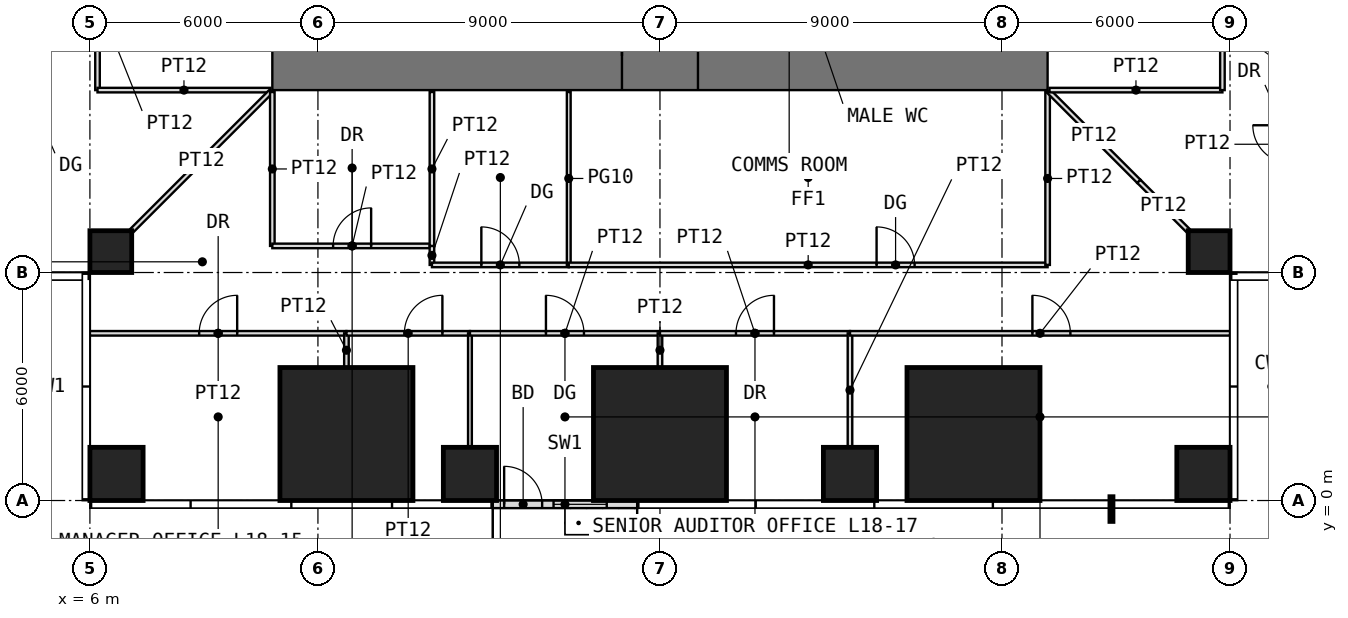
"""IFC4 building model, lengths in metres.
Left out: names, types, materials, properties, quantities, classifications, styles, units other than length and angle.
Written with IfcOpenShell. Run it as: python <this file> out.ifc"""

import sys

from ifc_helpers import new_model, si_unit, direction, frame, frame_2d, origin, origin_2d, place, context, subcontext, project, spatial, rectangle, extrude, element, fill, save


model = new_model("IFC4")
c1 = context("Model", 3, precision=1e-05, world=origin(), true_north=direction((0.0, 1.0)))
c2 = subcontext(c1, "Body", "Model", "MODEL_VIEW")
j1 = project(units=[si_unit("LENGTHUNIT", "METRE"), si_unit("PLANEANGLEUNIT", "RADIAN")], contexts=[c1])
p1 = place(None, origin())
s1 = spatial("IfcSite", under=j1, at=p1, CompositionType="ELEMENT")
p2 = place(p1, origin())
s2 = spatial("IfcBuilding", under=s1, at=p2, CompositionType="ELEMENT")
p3 = place(p2, frame((0.0, 0.0, 78.5)))
s3 = spatial("IfcBuildingStorey", under=s2, at=p3, CompositionType="ELEMENT", Elevation=78.5)
p4 = place(p3, frame((6.7, 0.7, 0.0), z_axis=(0.0, 0.0, 1.0), x_axis=(1.0, 0.0, 0.0)))
e1 = element("IfcColumn", 1, at=p4, inside=s3, PredefinedType="COLUMN", context=c2, shape_type="SweptSolid", body=[
    extrude(rectangle(XDim=1.4, YDim=1.4, at=origin_2d()), origin(), (0.0, 0.0, 1.0), 4.0),
])
p5 = place(p3, frame((12.75, 1.75, 0.0), z_axis=(0.0, 0.0, 1.0), x_axis=(1.0, 0.0, 0.0)))
e2 = element("IfcColumn", 2, at=p5, inside=s3, PredefinedType="COLUMN", context=c2, shape_type="SweptSolid", body=[
    extrude(rectangle(XDim=3.5, YDim=3.5, at=origin_2d()), origin(), (0.0, 0.0, 1.0), 4.0),
])
p6 = place(p3, frame((16.0, 0.7, 0.0), z_axis=(0.0, 0.0, 1.0), x_axis=(1.0, 0.0, 0.0)))
e3 = element("IfcColumn", 3, at=p6, inside=s3, PredefinedType="COLUMN", context=c2, shape_type="SweptSolid", body=[
    extrude(rectangle(XDim=1.4, YDim=1.4, at=origin_2d()), origin(), (0.0, 0.0, 1.0), 4.0),
])
p7 = place(p3, frame((21.0, 1.75, 0.0), z_axis=(0.0, 0.0, 1.0), x_axis=(1.0, 0.0, 0.0)))
e4 = element("IfcColumn", 4, at=p7, inside=s3, PredefinedType="COLUMN", context=c2, shape_type="SweptSolid", body=[
    extrude(rectangle(XDim=3.5, YDim=3.5, at=origin_2d()), origin(), (0.0, 0.0, 1.0), 4.0),
])
p8 = place(p3, frame((26.0, 0.7, 0.0), z_axis=(0.0, 0.0, 1.0), x_axis=(1.0, 0.0, 0.0)))
e5 = element("IfcColumn", 5, at=p8, inside=s3, PredefinedType="COLUMN", context=c2, shape_type="SweptSolid", body=[
    extrude(rectangle(XDim=1.4, YDim=1.4, at=origin_2d()), origin(), (0.0, 0.0, 1.0), 4.0),
])
p9 = place(p3, frame((29.25, 1.75, 0.0), z_axis=(0.0, 0.0, 1.0), x_axis=(1.0, 0.0, 0.0)))
e6 = element("IfcColumn", 6, at=p9, inside=s3, PredefinedType="COLUMN", context=c2, shape_type="SweptSolid", body=[
    extrude(rectangle(XDim=3.5, YDim=3.5, at=origin_2d()), origin(), (0.0, 0.0, 1.0), 4.0),
])
p10 = place(p3, frame((35.3, 0.7, 0.0), z_axis=(0.0, 0.0, 1.0), x_axis=(1.0, 0.0, 0.0)))
e7 = element("IfcColumn", 7, at=p10, inside=s3, PredefinedType="COLUMN", context=c2, shape_type="SweptSolid", body=[
    extrude(rectangle(XDim=1.4, YDim=1.4, at=origin_2d()), origin(), (0.0, 0.0, 1.0), 4.0),
])
for number, where, z_axis, x_axis in (
    (8, (6.55, 6.55, 0.0), (0.0, 0.0, 1.0), (1.0, 0.0, 0.0)),
    (9, (35.45, 6.55, 0.0), (0.0, 0.0, 1.0), (1.0, 0.0, 0.0)),
):
    element("IfcColumn", number, at=place(p3, frame(where, z_axis=z_axis, x_axis=x_axis)), inside=s3, PredefinedType="COLUMN", context=c2, shape_type="SweptSolid", body=[
        extrude(rectangle(XDim=1.1, YDim=1.1, at=origin_2d()), origin(), (0.0, 0.0, 1.0), 4.0),
    ])
p11 = place(p3, frame((16.6, -0.1, 0.0), z_axis=(0.0, 0.0, 1.0), x_axis=(1.0, 0.0, 0.0)))
e10 = element("IfcWall", 10, at=p11, inside=s3, PredefinedType="USERDEFINED", context=c2, shape_type="SweptSolid", body=[
    extrude(rectangle(XDim=3.8, YDim=0.2, at=frame_2d((1.9, 0.0))), origin(), (0.0, 0.0, 1.0), 3.75),
])
p12 = place(p11, frame((0.3, 0.0, 0.0)))
e11 = element("IfcOpeningElement", 11, at=p12, cuts=e10, PredefinedType="OPENING", context=c2, shape_type="SweptSolid", body=[
    extrude(rectangle(XDim=1.0, YDim=2.4, at=frame_2d((0.5, 1.2))), frame((0.0, 0.11, 0.0), z_axis=(0.0, -1.0, 0.0), x_axis=(1.0, 0.0, 0.0)), (0.0, 0.0, 1.0), 0.22),
])
p13 = place(p11, frame((1.6, 0.0, 0.3)))
e12 = element("IfcOpeningElement", 12, at=p13, cuts=e10, PredefinedType="OPENING", context=c2, shape_type="SweptSolid", body=[
    extrude(rectangle(XDim=1.4, YDim=2.7, at=frame_2d((0.7, 1.35))), frame((0.0, 0.11, 0.0), z_axis=(0.0, -1.0, 0.0), x_axis=(1.0, 0.0, 0.0)), (0.0, 0.0, 1.0), 0.22),
])
p14 = place(p3, frame((10.8, 11.7, -0.05), z_axis=(0.0, 0.0, 1.0), x_axis=(1.0, 0.0, 0.0)))
e13 = element("IfcWall", 13, at=p14, inside=s3, PredefinedType="SHEAR", context=c2, shape_type="SweptSolid", body=[
    extrude(rectangle(XDim=20.4, YDim=1.8, at=frame_2d((10.2, 0.0))), origin(), (0.0, 0.0, 1.0), 4.0),
])
p15 = place(p14, frame((9.2, 0.0, 0.05)))
e14 = element("IfcOpeningElement", 14, at=p15, cuts=e13, PredefinedType="OPENING", context=c2, shape_type="SweptSolid", body=[
    extrude(rectangle(XDim=2.0, YDim=2.2, at=frame_2d((1.0, 1.1))), frame((0.0, 0.91, 0.0), z_axis=(0.0, -1.0, 0.0), x_axis=(1.0, 0.0, 0.0)), (0.0, 0.0, 1.0), 1.82),
])
p16 = place(p3, frame((6.0, 4.4, 0.0), z_axis=(0.0, 0.0, 1.0), x_axis=(1.0, 0.0, 0.0)))
e15 = element("IfcWall", 15, at=p16, inside=s3, PredefinedType="PARTITIONING", context=c2, shape_type="SweptSolid", body=[
    extrude(rectangle(XDim=6.75, YDim=0.12, at=frame_2d((3.375, 0.0))), origin(), (0.0, 0.0, 1.0), 3.75),
])
p17 = place(p16, frame((2.875, 0.0, 0.0)))
e16 = element("IfcOpeningElement", 16, at=p17, cuts=e15, PredefinedType="OPENING", context=c2, shape_type="SweptSolid", body=[
    extrude(rectangle(XDim=1.0, YDim=2.2, at=frame_2d((0.5, 1.1))), frame((0.0, 0.07, 0.0), z_axis=(0.0, -1.0, 0.0), x_axis=(1.0, 0.0, 0.0)), (0.0, 0.0, 1.0), 0.14),
])
p18 = place(p3, frame((6.2, 10.8, 0.0), z_axis=(0.0, 0.0, 1.0), x_axis=(0.0, 1.0, 0.0)))
e17 = element("IfcWall", 17, at=p18, inside=s3, PredefinedType="PARTITIONING", context=c2, shape_type="SweptSolid", body=[
    extrude(rectangle(XDim=4.8, YDim=0.12, at=frame_2d((2.4, 0.0))), origin(), (0.0, 0.0, 1.0), 3.75),
])
p19 = place(p18, frame((1.9, 0.0, 0.0)))
e18 = element("IfcOpeningElement", 18, at=p19, cuts=e17, PredefinedType="OPENING", context=c2, shape_type="SweptSolid", body=[
    extrude(rectangle(XDim=1.0, YDim=2.4, at=frame_2d((0.5, 1.2))), frame((0.0, 0.07, 0.0), z_axis=(0.0, -1.0, 0.0), x_axis=(1.0, 0.0, 0.0)), (0.0, 0.0, 1.0), 0.14),
])
p20 = place(p3, frame((6.2, 10.8, 0.0), z_axis=(0.0, 0.0, 1.0), x_axis=(1.0, 0.0, 0.0)))
e19 = element("IfcWall", 19, at=p20, inside=s3, PredefinedType="PARTITIONING", context=c2, shape_type="SweptSolid", body=[
    extrude(rectangle(XDim=4.55, YDim=0.12, at=frame_2d((2.275, 0.0))), origin(), (0.0, 0.0, 1.0), 3.75),
])
p21 = place(p3, frame((7.11, 7.11, 0.0), z_axis=(0.0, 0.0, 1.0), x_axis=(0.707106781187, 0.707106781187, 0.0)))
e20 = element("IfcWall", 20, at=p21, inside=s3, PredefinedType="PARTITIONING", context=c2, shape_type="SweptSolid", body=[
    extrude(rectangle(XDim=5.168, YDim=0.12, at=frame_2d((2.584, 0.0))), origin(), (0.0, 0.0, 1.0), 3.75),
])
p22 = place(p3, frame((10.8, 6.7, 0.0), z_axis=(0.0, 0.0, 1.0), x_axis=(0.0, 1.0, 0.0)))
e21 = element("IfcWall", 21, at=p22, inside=s3, PredefinedType="PARTITIONING", context=c2, shape_type="SweptSolid", body=[
    extrude(rectangle(XDim=4.05, YDim=0.12, at=frame_2d((2.025, 0.0))), origin(), (0.0, 0.0, 1.0), 3.75),
])
p23 = place(p3, frame((10.8, 6.7, 0.0), z_axis=(0.0, 0.0, 1.0), x_axis=(1.0, 0.0, 0.0)))
e22 = element("IfcWall", 22, at=p23, inside=s3, PredefinedType="PARTITIONING", context=c2, shape_type="SweptSolid", body=[
    extrude(rectangle(XDim=4.2, YDim=0.12, at=frame_2d((2.1, 0.0))), origin(), (0.0, 0.0, 1.0), 3.75),
])
p24 = place(p23, frame((1.6, 0.0, 0.0)))
e23 = element("IfcOpeningElement", 23, at=p24, cuts=e22, PredefinedType="OPENING", context=c2, shape_type="SweptSolid", body=[
    extrude(rectangle(XDim=1.0, YDim=2.2, at=frame_2d((0.5, 1.1))), frame((0.0, 0.07, 0.0), z_axis=(0.0, -1.0, 0.0), x_axis=(1.0, 0.0, 0.0)), (0.0, 0.0, 1.0), 0.14),
])
p25 = place(p3, frame((12.75, 3.51, 0.0), z_axis=(0.0, 0.0, 1.0), x_axis=(0.0, 1.0, 0.0)))
e24 = element("IfcWall", 24, at=p25, inside=s3, PredefinedType="PARTITIONING", context=c2, shape_type="SweptSolid", body=[
    extrude(rectangle(XDim=0.89, YDim=0.12, at=frame_2d((0.445, 0.0))), origin(), (0.0, 0.0, 1.0), 3.75),
])
p26 = place(p3, frame((12.75, 4.4, 0.0), z_axis=(0.0, 0.0, 1.0), x_axis=(1.0, 0.0, 0.0)))
e25 = element("IfcWall", 25, at=p26, inside=s3, PredefinedType="PARTITIONING", context=c2, shape_type="SweptSolid", body=[
    extrude(rectangle(XDim=3.25, YDim=0.12, at=frame_2d((1.625, 0.0))), origin(), (0.0, 0.0, 1.0), 3.75),
])
p27 = place(p26, frame((1.525, 0.0, 0.0)))
e26 = element("IfcOpeningElement", 26, at=p27, cuts=e25, PredefinedType="OPENING", context=c2, shape_type="SweptSolid", body=[
    extrude(rectangle(XDim=1.0, YDim=2.4, at=frame_2d((0.5, 1.2))), frame((0.0, 0.07, 0.0), z_axis=(0.0, -1.0, 0.0), x_axis=(1.0, 0.0, 0.0)), (0.0, 0.0, 1.0), 0.14),
])
p28 = place(p3, frame((15.0, 6.2, 0.0), z_axis=(0.0, 0.0, 1.0), x_axis=(0.0, 1.0, 0.0)))
e27 = element("IfcWall", 27, at=p28, inside=s3, PredefinedType="PARTITIONING", context=c2, shape_type="SweptSolid", body=[
    extrude(rectangle(XDim=0.5, YDim=0.12, at=frame_2d((0.25, 0.0))), origin(), (0.0, 0.0, 1.0), 3.75),
])
p29 = place(p3, frame((15.0, 6.2, 0.0), z_axis=(0.0, 0.0, 1.0), x_axis=(1.0, 0.0, 0.0)))
e28 = element("IfcWall", 28, at=p29, inside=s3, PredefinedType="PARTITIONING", context=c2, shape_type="SweptSolid", body=[
    extrude(rectangle(XDim=3.6, YDim=0.12, at=frame_2d((1.8, 0.0))), origin(), (0.0, 0.0, 1.0), 3.75),
])
p30 = place(p29, frame((1.3, 0.0, 0.0)))
e29 = element("IfcOpeningElement", 29, at=p30, cuts=e28, PredefinedType="OPENING", context=c2, shape_type="SweptSolid", body=[
    extrude(rectangle(XDim=1.0, YDim=2.4, at=frame_2d((0.5, 1.2))), frame((0.0, 0.07, 0.0), z_axis=(0.0, -1.0, 0.0), x_axis=(1.0, 0.0, 0.0)), (0.0, 0.0, 1.0), 0.14),
])
p31 = place(p3, frame((15.0, 6.7, 0.0), z_axis=(0.0, 0.0, 1.0), x_axis=(0.0, 1.0, 0.0)))
e30 = element("IfcWall", 30, at=p31, inside=s3, PredefinedType="PARTITIONING", context=c2, shape_type="SweptSolid", body=[
    extrude(rectangle(XDim=4.05, YDim=0.12, at=frame_2d((2.025, 0.0))), origin(), (0.0, 0.0, 1.0), 3.75),
])
p32 = place(p3, frame((16.0, 1.41, 0.0), z_axis=(0.0, 0.0, 1.0), x_axis=(0.0, 1.0, 0.0)))
e31 = element("IfcWall", 31, at=p32, inside=s3, PredefinedType="PARTITIONING", context=c2, shape_type="SweptSolid", body=[
    extrude(rectangle(XDim=2.99, YDim=0.1, at=frame_2d((1.495, 0.0))), origin(), (0.0, 0.0, 1.0), 3.75),
])
p33 = place(p3, frame((16.0, 4.4, 0.0), z_axis=(0.0, 0.0, 1.0), x_axis=(1.0, 0.0, 0.0)))
e32 = element("IfcWall", 32, at=p33, inside=s3, PredefinedType="PARTITIONING", context=c2, shape_type="SweptSolid", body=[
    extrude(rectangle(XDim=5.0, YDim=0.12, at=frame_2d((2.5, 0.0))), origin(), (0.0, 0.0, 1.0), 3.75),
])
p34 = place(p33, frame((2.0, 0.0, 0.0)))
e33 = element("IfcOpeningElement", 33, at=p34, cuts=e32, PredefinedType="OPENING", context=c2, shape_type="SweptSolid", body=[
    extrude(rectangle(XDim=1.0, YDim=2.4, at=frame_2d((0.5, 1.2))), frame((0.0, 0.07, 0.0), z_axis=(0.0, -1.0, 0.0), x_axis=(1.0, 0.0, 0.0)), (0.0, 0.0, 1.0), 0.14),
])
p35 = place(p3, frame((18.6, 6.2, 0.0), z_axis=(0.0, 0.0, 1.0), x_axis=(0.0, 1.0, 0.0)))
e34 = element("IfcWall", 34, at=p35, inside=s3, PredefinedType="PARTITIONING", context=c2, shape_type="SweptSolid", body=[
    extrude(rectangle(XDim=4.55, YDim=0.1, at=frame_2d((2.275, 0.0))), origin(), (0.0, 0.0, 1.0), 3.75),
])
p36 = place(p3, frame((18.6, 6.2, 0.0), z_axis=(0.0, 0.0, 1.0), x_axis=(1.0, 0.0, 0.0)))
e35 = element("IfcWall", 35, at=p36, inside=s3, PredefinedType="PARTITIONING", context=c2, shape_type="SweptSolid", body=[
    extrude(rectangle(XDim=12.6, YDim=0.12, at=frame_2d((6.3, 0.0))), origin(), (0.0, 0.0, 1.0), 3.75),
])
p37 = place(p36, frame((8.1, 0.0, 0.0)))
e36 = element("IfcOpeningElement", 36, at=p37, cuts=e35, PredefinedType="OPENING", context=c2, shape_type="SweptSolid", body=[
    extrude(rectangle(XDim=1.0, YDim=2.4, at=frame_2d((0.5, 1.2))), frame((0.0, 0.07, 0.0), z_axis=(0.0, -1.0, 0.0), x_axis=(1.0, 0.0, 0.0)), (0.0, 0.0, 1.0), 0.14),
])
p38 = place(p3, frame((21.0, 3.51, 0.0), z_axis=(0.0, 0.0, 1.0), x_axis=(0.0, 1.0, 0.0)))
e37 = element("IfcWall", 37, at=p38, inside=s3, PredefinedType="PARTITIONING", context=c2, shape_type="SweptSolid", body=[
    extrude(rectangle(XDim=0.89, YDim=0.12, at=frame_2d((0.445, 0.0))), origin(), (0.0, 0.0, 1.0), 3.75),
])
p39 = place(p3, frame((21.0, 4.4, 0.0), z_axis=(0.0, 0.0, 1.0), x_axis=(1.0, 0.0, 0.0)))
e38 = element("IfcWall", 38, at=p39, inside=s3, PredefinedType="PARTITIONING", context=c2, shape_type="SweptSolid", body=[
    extrude(rectangle(XDim=5.0, YDim=0.12, at=frame_2d((2.5, 0.0))), origin(), (0.0, 0.0, 1.0), 3.75),
])
p40 = place(p39, frame((2.0, 0.0, 0.0)))
e39 = element("IfcOpeningElement", 39, at=p40, cuts=e38, PredefinedType="OPENING", context=c2, shape_type="SweptSolid", body=[
    extrude(rectangle(XDim=1.0, YDim=2.2, at=frame_2d((0.5, 1.1))), frame((0.0, 0.07, 0.0), z_axis=(0.0, -1.0, 0.0), x_axis=(1.0, 0.0, 0.0)), (0.0, 0.0, 1.0), 0.14),
])
p41 = place(p3, frame((26.0, 1.41, 0.0), z_axis=(0.0, 0.0, 1.0), x_axis=(0.0, 1.0, 0.0)))
e40 = element("IfcWall", 40, at=p41, inside=s3, PredefinedType="PARTITIONING", context=c2, shape_type="SweptSolid", body=[
    extrude(rectangle(XDim=2.99, YDim=0.12, at=frame_2d((1.495, 0.0))), origin(), (0.0, 0.0, 1.0), 3.75),
])
p42 = place(p3, frame((26.0, 4.4, 0.0), z_axis=(0.0, 0.0, 1.0), x_axis=(1.0, 0.0, 0.0)))
e41 = element("IfcWall", 41, at=p42, inside=s3, PredefinedType="PARTITIONING", context=c2, shape_type="SweptSolid", body=[
    extrude(rectangle(XDim=10.0, YDim=0.12, at=frame_2d((5.0, 0.0))), origin(), (0.0, 0.0, 1.0), 3.75),
])
p43 = place(p42, frame((4.8, 0.0, 0.0)))
e42 = element("IfcOpeningElement", 42, at=p43, cuts=e41, PredefinedType="OPENING", context=c2, shape_type="SweptSolid", body=[
    extrude(rectangle(XDim=1.0, YDim=2.4, at=frame_2d((0.5, 1.2))), frame((0.0, 0.07, 0.0), z_axis=(0.0, -1.0, 0.0), x_axis=(1.0, 0.0, 0.0)), (0.0, 0.0, 1.0), 0.14),
])
p44 = place(p3, frame((31.2, 6.2, 0.0), z_axis=(0.0, 0.0, 1.0), x_axis=(0.0, 1.0, 0.0)))
e43 = element("IfcWall", 43, at=p44, inside=s3, PredefinedType="PARTITIONING", context=c2, shape_type="SweptSolid", body=[
    extrude(rectangle(XDim=4.55, YDim=0.12, at=frame_2d((2.275, 0.0))), origin(), (0.0, 0.0, 1.0), 3.75),
])
p45 = place(p3, frame((31.235, 10.765, 0.0), z_axis=(0.0, 0.0, 1.0), x_axis=(0.707106781187, -0.707106781187, 0.0)))
e44 = element("IfcWall", 44, at=p45, inside=s3, PredefinedType="PARTITIONING", context=c2, shape_type="SweptSolid", body=[
    extrude(rectangle(XDim=3.346, YDim=0.12, at=frame_2d((1.673, 0.0))), origin(), (0.0, 0.0, 1.0), 3.75),
])
p46 = place(p3, frame((31.25, 10.8, 0.0), z_axis=(0.0, 0.0, 1.0), x_axis=(1.0, 0.0, 0.0)))
e45 = element("IfcWall", 45, at=p46, inside=s3, PredefinedType="PARTITIONING", context=c2, shape_type="SweptSolid", body=[
    extrude(rectangle(XDim=4.55, YDim=0.12, at=frame_2d((2.275, 0.0))), origin(), (0.0, 0.0, 1.0), 3.75),
])
p47 = place(p3, frame((33.602, 8.398, 0.0), z_axis=(0.0, 0.0, 1.0), x_axis=(0.707106781187, -0.707106781187, 0.0)))
e46 = element("IfcWall", 46, at=p47, inside=s3, PredefinedType="PARTITIONING", context=c2, shape_type="SweptSolid", body=[
    extrude(rectangle(XDim=1.822, YDim=0.12, at=frame_2d((0.911, 0.0))), origin(), (0.0, 0.0, 1.0), 3.75),
])
p48 = place(p3, frame((35.8, 10.8, 0.0), z_axis=(0.0, 0.0, 1.0), x_axis=(0.0, 1.0, 0.0)))
e47 = element("IfcWall", 47, at=p48, inside=s3, PredefinedType="PARTITIONING", context=c2, shape_type="SweptSolid", body=[
    extrude(rectangle(XDim=7.0, YDim=0.12, at=frame_2d((3.5, 0.0))), origin(), (0.0, 0.0, 1.0), 3.75),
])
p49 = place(p48, frame((3.0, 0.0, 0.0)))
e48 = element("IfcOpeningElement", 48, at=p49, cuts=e47, PredefinedType="OPENING", context=c2, shape_type="SweptSolid", body=[
    extrude(rectangle(XDim=1.0, YDim=2.4, at=frame_2d((0.5, 1.2))), frame((0.0, 0.07, 0.0), z_axis=(0.0, -1.0, 0.0), x_axis=(1.0, 0.0, 0.0)), (0.0, 0.0, 1.0), 0.14),
])
p50 = place(p12, origin())
e49 = element("IfcDoor", 49, at=p50, inside=s3, OperationType="SINGLE_SWING_LEFT", PredefinedType="DOOR", context=c2, shape_type="SweptSolid", body=[
    extrude(rectangle(XDim=1.0, YDim=2.4, at=frame_2d((0.5, 1.2))), frame((0.0, 0.025, 0.0), z_axis=(0.0, -1.0, 0.0), x_axis=(1.0, 0.0, 0.0)), (0.0, 0.0, 1.0), 0.05),
])
fill(e11, e49)
p51 = place(p13, origin())
e50 = element("IfcWindow", 50, at=p51, inside=s3, PartitioningType="SINGLE_PANEL", PredefinedType="WINDOW", context=c2, shape_type="SweptSolid", body=[
    extrude(rectangle(XDim=1.4, YDim=2.7, at=frame_2d((0.7, 1.35))), frame((0.0, 0.03, 0.0), z_axis=(0.0, -1.0, 0.0), x_axis=(1.0, 0.0, 0.0)), (0.0, 0.0, 1.0), 0.06),
])
fill(e12, e50)
p52 = place(p15, origin())
e51 = element("IfcDoor", 51, at=p52, inside=s3, OperationType="DOUBLE_DOOR_SINGLE_SWING", PredefinedType="DOOR", context=c2, shape_type="SweptSolid", body=[
    extrude(rectangle(XDim=2.0, YDim=2.2, at=frame_2d((1.0, 1.1))), frame((0.0, 0.025, 0.0), z_axis=(0.0, -1.0, 0.0), x_axis=(1.0, 0.0, 0.0)), (0.0, 0.0, 1.0), 0.05),
])
fill(e14, e51)
p53 = place(p24, origin())
e52 = element("IfcDoor", 52, at=p53, inside=s3, OperationType="SINGLE_SWING_RIGHT", PredefinedType="DOOR", context=c2, shape_type="SweptSolid", body=[
    extrude(rectangle(XDim=1.0, YDim=2.2, at=frame_2d((0.5, 1.1))), frame((0.0, 0.025, 0.0), z_axis=(0.0, -1.0, 0.0), x_axis=(1.0, 0.0, 0.0)), (0.0, 0.0, 1.0), 0.05),
])
fill(e23, e52)
p54 = place(p30, origin())
e53 = element("IfcDoor", 53, at=p54, inside=s3, OperationType="SINGLE_SWING_LEFT", PredefinedType="DOOR", context=c2, shape_type="SweptSolid", body=[
    extrude(rectangle(XDim=1.0, YDim=2.4, at=frame_2d((0.5, 1.2))), frame((0.0, 0.025, 0.0), z_axis=(0.0, -1.0, 0.0), x_axis=(1.0, 0.0, 0.0)), (0.0, 0.0, 1.0), 0.05),
])
fill(e29, e53)
p55 = place(p17, origin())
e54 = element("IfcDoor", 54, at=p55, inside=s3, OperationType="SINGLE_SWING_RIGHT", PredefinedType="DOOR", context=c2, shape_type="SweptSolid", body=[
    extrude(rectangle(XDim=1.0, YDim=2.2, at=frame_2d((0.5, 1.1))), frame((0.0, 0.025, 0.0), z_axis=(0.0, -1.0, 0.0), x_axis=(1.0, 0.0, 0.0)), (0.0, 0.0, 1.0), 0.05),
])
fill(e16, e54)
p56 = place(p34, origin())
e55 = element("IfcDoor", 55, at=p56, inside=s3, OperationType="SINGLE_SWING_LEFT", PredefinedType="DOOR", context=c2, shape_type="SweptSolid", body=[
    extrude(rectangle(XDim=1.0, YDim=2.4, at=frame_2d((0.5, 1.2))), frame((0.0, 0.025, 0.0), z_axis=(0.0, -1.0, 0.0), x_axis=(1.0, 0.0, 0.0)), (0.0, 0.0, 1.0), 0.05),
])
fill(e33, e55)
p57 = place(p40, origin())
e56 = element("IfcDoor", 56, at=p57, inside=s3, OperationType="SINGLE_SWING_RIGHT", PredefinedType="DOOR", context=c2, shape_type="SweptSolid", body=[
    extrude(rectangle(XDim=1.0, YDim=2.2, at=frame_2d((0.5, 1.1))), frame((0.0, 0.025, 0.0), z_axis=(0.0, -1.0, 0.0), x_axis=(1.0, 0.0, 0.0)), (0.0, 0.0, 1.0), 0.05),
])
fill(e39, e56)
p58 = place(p27, origin())
e57 = element("IfcDoor", 57, at=p58, inside=s3, OperationType="SINGLE_SWING_RIGHT", PredefinedType="DOOR", context=c2, shape_type="SweptSolid", body=[
    extrude(rectangle(XDim=1.0, YDim=2.4, at=frame_2d((0.5, 1.2))), frame((0.0, 0.025, 0.0), z_axis=(0.0, -1.0, 0.0), x_axis=(1.0, 0.0, 0.0)), (0.0, 0.0, 1.0), 0.05),
])
fill(e26, e57)
p59 = place(p43, origin())
e58 = element("IfcDoor", 58, at=p59, inside=s3, OperationType="SINGLE_SWING_LEFT", PredefinedType="DOOR", context=c2, shape_type="SweptSolid", body=[
    extrude(rectangle(XDim=1.0, YDim=2.4, at=frame_2d((0.5, 1.2))), frame((0.0, 0.025, 0.0), z_axis=(0.0, -1.0, 0.0), x_axis=(1.0, 0.0, 0.0)), (0.0, 0.0, 1.0), 0.05),
])
fill(e42, e58)
p60 = place(p37, origin())
e59 = element("IfcDoor", 59, at=p60, inside=s3, OperationType="SINGLE_SWING_LEFT", PredefinedType="DOOR", context=c2, shape_type="SweptSolid", body=[
    extrude(rectangle(XDim=1.0, YDim=2.4, at=frame_2d((0.5, 1.2))), frame((0.0, 0.025, 0.0), z_axis=(0.0, -1.0, 0.0), x_axis=(1.0, 0.0, 0.0)), (0.0, 0.0, 1.0), 0.05),
])
fill(e36, e59)
save(model, sys.argv[1])
